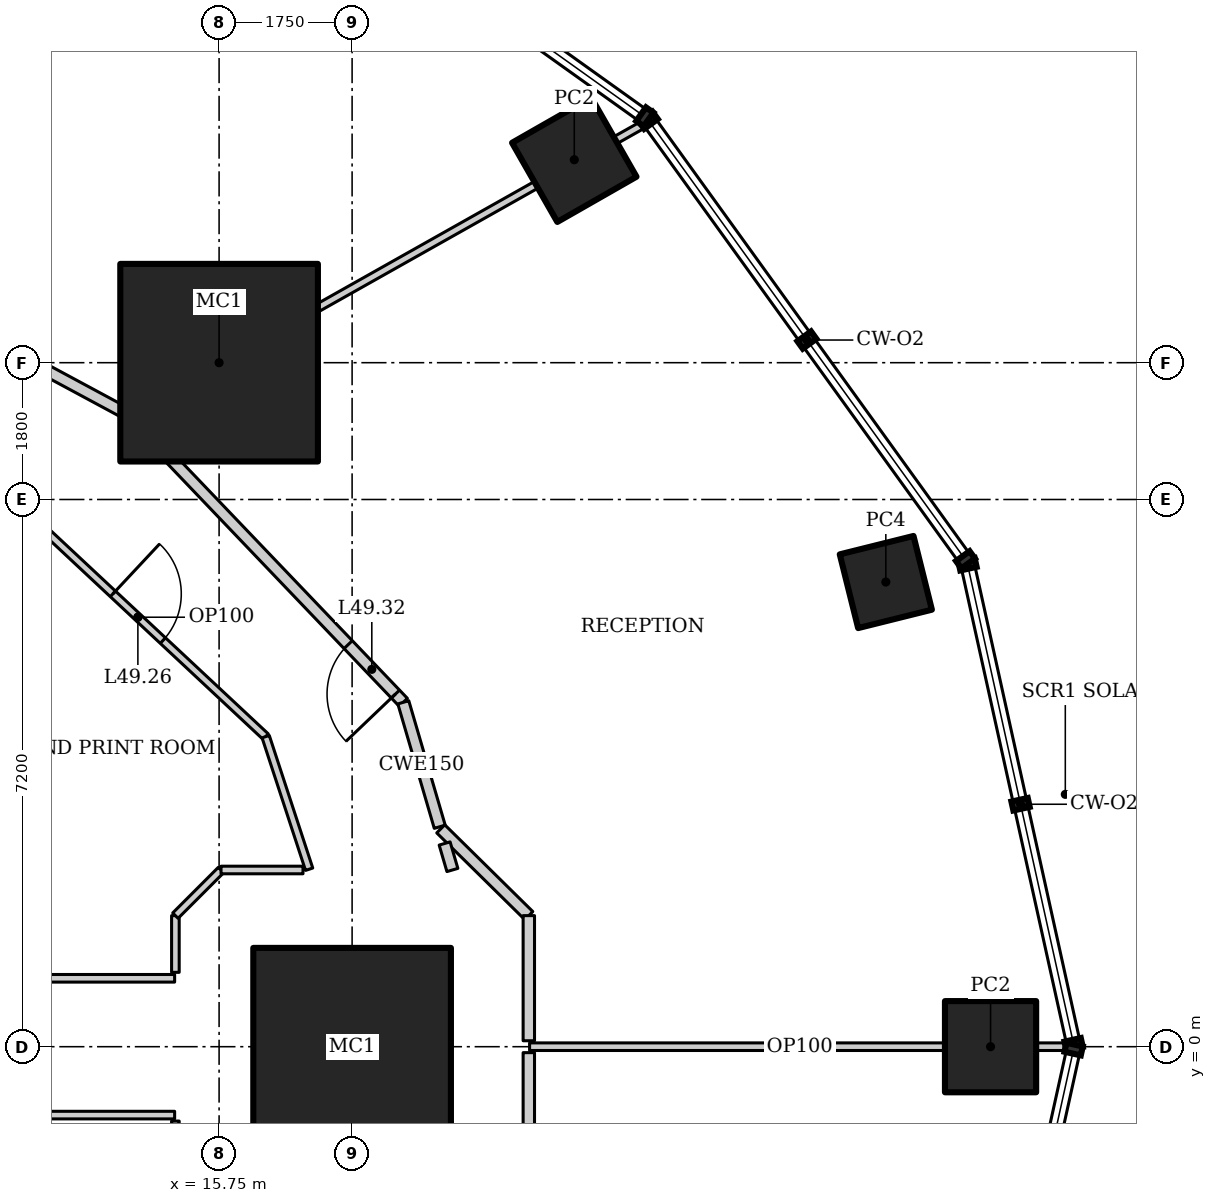
"""IFC4 building model, lengths in metres.
Left out: names, types, materials, properties, quantities, classifications, styles, units other than length and angle.
Written with IfcOpenShell. Run it as: python <this file> out.ifc"""

import sys

from ifc_helpers import new_model, si_unit, direction, frame, frame_2d, origin, origin_2d, place, context, subcontext, project, spatial, rectangle, hollow_rectangle, extrude, element, fill, save


model = new_model("IFC4")
c1 = context("Model", 3, precision=1e-05, world=origin(), true_north=direction((0.0, 1.0)))
c2 = subcontext(c1, "Body", "Model", "MODEL_VIEW")
j1 = project(units=[si_unit("LENGTHUNIT", "METRE"), si_unit("PLANEANGLEUNIT", "RADIAN")], contexts=[c1])
p1 = place(None, origin())
s1 = spatial("IfcSite", under=j1, at=p1, CompositionType="ELEMENT")
p2 = place(p1, origin())
s2 = spatial("IfcBuilding", under=s1, at=p2, CompositionType="ELEMENT")
p3 = place(p2, frame((0.0, 0.0, 211.6)))
s3 = spatial("IfcBuildingStorey", under=s2, at=p3, CompositionType="ELEMENT", Elevation=211.6)
for number, where, z_axis, x_axis in (
    (1, (17.5, 0.0, 0.0), (0.0, 0.0, 1.0), (1.0, 0.0, 0.0)),
    (2, (15.75, 9.0, 0.0), (0.0, 0.0, 1.0), (1.0, 0.0, 0.0)),
):
    element("IfcColumn", number, at=place(p3, frame(where, z_axis=z_axis, x_axis=x_axis)), inside=s3, PredefinedType="COLUMN", context=c2, shape_type="SweptSolid", body=[
        extrude(hollow_rectangle(XDim=2.6, YDim=2.6, WallThickness=0.13, at=origin_2d()), origin(), (0.0, 0.0, 1.0), 4.2),
    ])
p4 = place(p3, frame((25.9, 0.0, 0.0), z_axis=(0.0, 0.0, 1.0), x_axis=(1.0, 0.0, 0.0)))
e3 = element("IfcColumn", 3, at=p4, inside=s3, PredefinedType="COLUMN", context=c2, shape_type="SweptSolid", body=[
    extrude(hollow_rectangle(XDim=1.2, YDim=1.2, WallThickness=0.1, at=origin_2d()), origin(), (0.0, 0.0, 1.0), 4.2),
])
p5 = place(p3, frame((24.522, 6.114, 0.0), z_axis=(0.0, 0.0, 1.0), x_axis=(0.970295726276, 0.2419218956, 0.0)))
e4 = element("IfcColumn", 4, at=p5, inside=s3, PredefinedType="COLUMN", context=c2, shape_type="SweptSolid", body=[
    extrude(hollow_rectangle(XDim=1.0, YDim=1.0, WallThickness=0.08, at=origin_2d()), origin(), (0.0, 0.0, 1.0), 4.2),
])
p6 = place(p3, frame((20.423, 11.67, 0.0), z_axis=(0.0, 0.0, 1.0), x_axis=(0.86824298017, 0.496139221777, 0.0)))
e5 = element("IfcColumn", 5, at=p6, inside=s3, PredefinedType="COLUMN", context=c2, shape_type="SweptSolid", body=[
    extrude(hollow_rectangle(XDim=1.2, YDim=1.2, WallThickness=0.1, at=origin_2d()), origin(), (0.0, 0.0, 1.0), 4.2),
])
p7 = place(p3, frame((21.358, 12.15, 0.0), z_axis=(0.0, 0.0, 1.0), x_axis=(-0.871273053995, -0.490798599614, 0.0)))
e6 = element("IfcWall", 6, at=p7, inside=s3, PredefinedType="PARTITIONING", context=c2, shape_type="SweptSolid", body=[
    extrude(rectangle(XDim=7.807, YDim=0.1, at=frame_2d((3.904, 0.0))), origin(), (0.0, 0.0, 1.0), 3.524),
])
p8 = place(p3, frame((18.174, 4.531, 0.0), z_axis=(0.0, 0.0, 1.0), x_axis=(-0.690768413292, 0.723076067366, 0.0)))
e7 = element("IfcWall", 7, at=p8, inside=s3, PredefinedType="PARTITIONING", context=c2, shape_type="SweptSolid", body=[
    extrude(rectangle(XDim=5.237, YDim=0.15, at=frame_2d((2.618, 0.0))), origin(), (0.0, 0.0, 1.0), 4.05),
])
p9 = place(p8, frame((0.15, 0.0, 0.0)))
e8 = element("IfcOpeningElement", 8, at=p9, cuts=e7, PredefinedType="OPENING", context=c2, shape_type="SweptSolid", body=[
    extrude(rectangle(XDim=0.9, YDim=2.1, at=frame_2d((0.45, 1.05))), frame((0.0, 0.085, 0.0), z_axis=(0.0, -1.0, 0.0), x_axis=(1.0, 0.0, 0.0)), (0.0, 0.0, 1.0), 0.17),
])
p10 = place(p3, frame((14.556, 8.318, 0.0), z_axis=(0.0, 0.0, 1.0), x_axis=(-0.88053863253, 0.47397438393, 0.0)))
e9 = element("IfcWall", 9, at=p10, inside=s3, PredefinedType="PARTITIONING", context=c2, shape_type="SweptSolid", body=[
    extrude(rectangle(XDim=4.875, YDim=0.15, at=frame_2d((2.438, 0.0))), origin(), (0.0, 0.0, 1.0), 4.05),
])
p11 = place(p3, frame((13.0, 7.222, 0.0), z_axis=(0.0, 0.0, 1.0), x_axis=(0.730651186567, -0.682750938167, 0.0)))
e10 = element("IfcWall", 10, at=p11, inside=s3, PredefinedType="PARTITIONING", context=c2, shape_type="SweptSolid", body=[
    extrude(rectangle(XDim=4.603, YDim=0.1, at=frame_2d((2.301, 0.0))), origin(), (0.0, 0.0, 1.0), 4.05),
])
p12 = place(p11, frame((1.851, 0.0, 0.0)))
e11 = element("IfcOpeningElement", 11, at=p12, cuts=e10, PredefinedType="OPENING", context=c2, shape_type="SweptSolid", body=[
    extrude(rectangle(XDim=0.9, YDim=2.1, at=frame_2d((0.45, 1.05))), frame((0.0, 0.06, 0.0), z_axis=(0.0, -1.0, 0.0), x_axis=(1.0, 0.0, 0.0)), (0.0, 0.0, 1.0), 0.12),
])
p13 = place(p3, frame((12.6, 13.0, 0.0), z_axis=(0.0, 0.0, 1.0), x_axis=(0.682434118301, 0.730947107648, 0.0)))
e12 = element("IfcWall", 12, at=p13, inside=s3, PredefinedType="PARTITIONING", context=c2, shape_type="SweptSolid", body=[
    extrude(rectangle(XDim=2.702, YDim=0.1, at=frame_2d((1.351, 0.0))), origin(), (0.0, 0.0, 1.0), 3.41),
])
p14 = place(p3, frame((26.944, 0.0, 0.0), z_axis=(0.0, 0.0, 1.0), x_axis=(-1.0, 0.0, 0.0)))
e13 = element("IfcWall", 13, at=p14, inside=s3, PredefinedType="PARTITIONING", context=c2, shape_type="SweptSolid", body=[
    extrude(rectangle(XDim=7.109, YDim=0.1, at=frame_2d((3.555, 0.0))), origin(), (0.0, 0.0, 1.0), 3.349),
])
p15 = place(p3, frame((18.653, 2.894, 0.0), z_axis=(0.0, 0.0, 1.0), x_axis=(-0.281027335084, 0.959699763955, 0.0)))
e14 = element("IfcWall", 14, at=p15, inside=s3, PredefinedType="PARTITIONING", context=c2, shape_type="SweptSolid", body=[
    extrude(rectangle(XDim=1.706, YDim=0.15, at=frame_2d((0.853, 0.0))), origin(), (0.0, 0.0, 1.0), 4.05),
])
p16 = place(p3, frame((13.0, -0.9, 0.0), z_axis=(0.0, 0.0, 1.0), x_axis=(1.0, 0.0, 0.0)))
e15 = element("IfcWall", 15, at=p16, inside=s3, PredefinedType="PARTITIONING", context=c2, shape_type="SweptSolid", body=[
    extrude(rectangle(XDim=2.165, YDim=0.1, at=frame_2d((1.083, 0.0))), origin(), (0.0, 0.0, 1.0), 4.05),
])
p17 = place(p3, frame((16.363, 4.08, 0.0), z_axis=(0.0, 0.0, 1.0), x_axis=(0.311517212063, -0.950240509865, 0.0)))
e16 = element("IfcWall", 16, at=p17, inside=s3, PredefinedType="PARTITIONING", context=c2, shape_type="SweptSolid", body=[
    extrude(rectangle(XDim=1.836, YDim=0.1, at=frame_2d((0.918, 0.0))), origin(), (0.0, 0.0, 1.0), 4.05),
])
p18 = place(p3, frame((15.165, 0.9, 0.0), z_axis=(0.0, 0.0, 1.0), x_axis=(-1.0, 0.0, 0.0)))
e17 = element("IfcWall", 17, at=p18, inside=s3, PredefinedType="PARTITIONING", context=c2, shape_type="SweptSolid", body=[
    extrude(rectangle(XDim=2.165, YDim=0.1, at=frame_2d((1.083, 0.0))), origin(), (0.0, 0.0, 1.0), 4.05),
])
for number, where, z_axis, x_axis in (
    (18, (15.175, -1.725, 0.0), (0.0, 0.0, 1.0), (0.0, 1.0, 0.0)),
    (19, (15.175, 0.978, 0.0), (0.0, 0.0, 1.0), (0.0, 1.0, 0.0)),
):
    element("IfcWall", number, at=place(p3, frame(where, z_axis=z_axis, x_axis=x_axis)), inside=s3, PredefinedType="PARTITIONING", context=c2, shape_type="SweptSolid", body=[
        extrude(rectangle(XDim=0.746, YDim=0.1, at=frame_2d((0.373, 0.0))), origin(), (0.0, 0.0, 1.0), 4.05),
    ])
p19 = place(p3, frame((15.175, 1.725, 0.0), z_axis=(0.0, 0.0, 1.0), x_axis=(0.707106781187, 0.707106781187, 0.0)))
e20 = element("IfcWall", 20, at=p19, inside=s3, PredefinedType="PARTITIONING", context=c2, shape_type="SweptSolid", body=[
    extrude(rectangle(XDim=0.849, YDim=0.1, at=frame_2d((0.425, 0.0))), origin(), (0.0, 0.0, 1.0), 4.05),
])
p20 = place(p3, frame((15.775, 2.325, 0.0), z_axis=(0.0, 0.0, 1.0), x_axis=(1.0, 0.0, 0.0)))
e21 = element("IfcWall", 21, at=p20, inside=s3, PredefinedType="PARTITIONING", context=c2, shape_type="SweptSolid", body=[
    extrude(rectangle(XDim=1.078, YDim=0.1, at=frame_2d((0.539, 0.0))), origin(), (0.0, 0.0, 1.0), 4.05),
])
p21 = place(p3, frame((18.666, 2.866, 0.0), z_axis=(0.0, 0.0, 1.0), x_axis=(0.712265481509, -0.701910167935, 0.0)))
e22 = element("IfcWall", 22, at=p21, inside=s3, PredefinedType="PARTITIONING", context=c2, shape_type="SweptSolid", body=[
    extrude(rectangle(XDim=1.627, YDim=0.15, at=frame_2d((0.813, 0.0))), origin(), (0.0, 0.0, 1.0), 4.05),
])
for number, where, z_axis, x_axis in (
    (23, (19.825, 1.725, 0.0), (0.0, 0.0, 1.0), (0.0, -1.0, 0.0)),
    (24, (19.825, -0.078, 0.0), (0.0, 0.0, 1.0), (0.0, -1.0, 0.0)),
):
    element("IfcWall", number, at=place(p3, frame(where, z_axis=z_axis, x_axis=x_axis)), inside=s3, PredefinedType="PARTITIONING", context=c2, shape_type="SweptSolid", body=[
        extrude(rectangle(XDim=1.646, YDim=0.15, at=frame_2d((0.823, 0.0))), origin(), (0.0, 0.0, 1.0), 4.05),
    ])
p22 = place(p3, frame((18.82, 2.325, 0.0), z_axis=(0.0, 0.0, 1.0), x_axis=(-0.281366391393, 0.959600413607, 0.0)))
e25 = element("IfcWall", 25, at=p22, inside=s3, PredefinedType="PARTITIONING", context=c2, shape_type="SweptSolid", body=[
    extrude(rectangle(XDim=0.364, YDim=0.15, at=frame_2d((0.182, 0.0))), origin(), (0.0, 0.0, 1.0), 4.05),
])
p23 = place(p12, origin())
e26 = element("IfcDoor", 26, at=p23, inside=s3, OperationType="SINGLE_SWING_LEFT", PredefinedType="DOOR", context=c2, shape_type="SweptSolid", body=[
    extrude(rectangle(XDim=0.9, YDim=2.1, at=frame_2d((0.45, 1.05))), frame((0.0, 0.025, 0.0), z_axis=(0.0, -1.0, 0.0), x_axis=(1.0, 0.0, 0.0)), (0.0, 0.0, 1.0), 0.05),
])
fill(e11, e26)
p24 = place(p9, origin())
e27 = element("IfcDoor", 27, at=p24, inside=s3, OperationType="SINGLE_SWING_LEFT", PredefinedType="DOOR", context=c2, shape_type="SweptSolid", body=[
    extrude(rectangle(XDim=0.9, YDim=2.1, at=frame_2d((0.45, 1.05))), frame((0.0, 0.025, 0.0), z_axis=(0.0, -1.0, 0.0), x_axis=(1.0, 0.0, 0.0)), (0.0, 0.0, 1.0), 0.05),
])
fill(e8, e27)
save(model, sys.argv[1])
